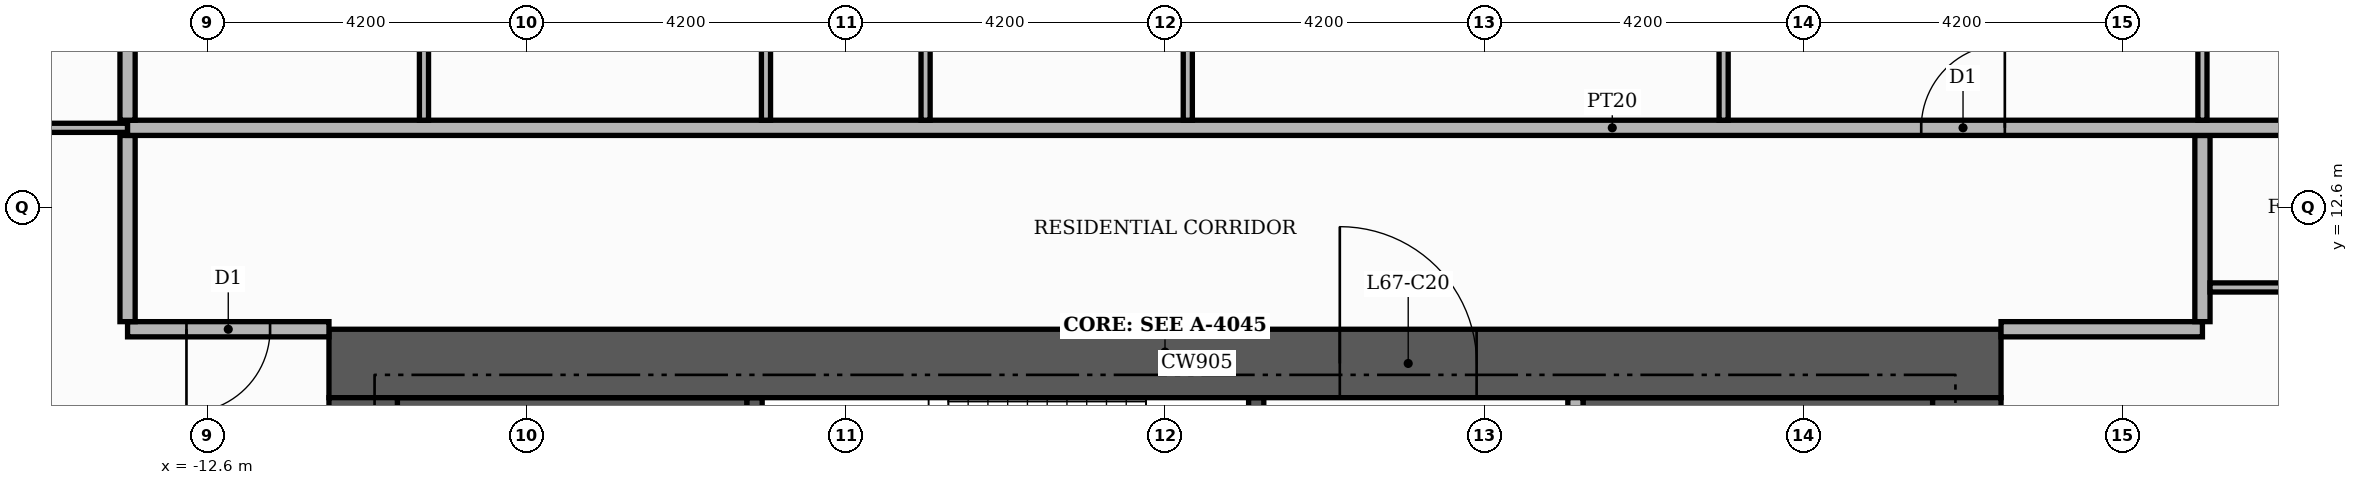
"""IFC4 building model, lengths in metres.
Left out: names, types, materials, properties, quantities, classifications, styles, units other than length and angle.
Written with IfcOpenShell. Run it as: python <this file> out.ifc"""

import sys

from ifc_helpers import new_model, si_unit, direction, frame, frame_2d, origin, place, context, subcontext, project, spatial, rectangle, extrude, element, fill, save


model = new_model("IFC4")
c1 = context("Model", 3, precision=1e-05, world=origin(), true_north=direction((0.0, 1.0)))
c2 = subcontext(c1, "Body", "Model", "MODEL_VIEW")
j1 = project(units=[si_unit("LENGTHUNIT", "METRE"), si_unit("PLANEANGLEUNIT", "RADIAN")], contexts=[c1])
p1 = place(None, origin())
s1 = spatial("IfcSite", under=j1, at=p1, CompositionType="ELEMENT")
p2 = place(p1, origin())
s2 = spatial("IfcBuilding", under=s1, at=p2, CompositionType="ELEMENT")
p3 = place(p2, frame((0.0, 0.0, 279.6)))
s3 = spatial("IfcBuildingStorey", under=s2, at=p3, CompositionType="ELEMENT", Elevation=279.6)
for number, where, z_axis, x_axis in (
    (1, (-10.1, 9.15, 0.0), (0.0, 0.0, 1.0), (1.0, 0.0, 0.0)),
    (2, (5.5, 9.15, 0.0), (0.0, 0.0, 1.0), (1.0, 0.0, 0.0)),
):
    element("IfcWall", number, at=place(p3, frame(where, z_axis=z_axis, x_axis=x_axis)), inside=s3, PredefinedType="SHEAR", context=c2, shape_type="SweptSolid", body=[
        extrude(rectangle(XDim=4.6, YDim=1.9, at=frame_2d((2.3, 0.0))), origin(), (0.0, 0.0, 1.0), 3.48),
    ])
p4 = place(p3, frame((-5.4, 7.25, 0.0), z_axis=(0.0, 0.0, 1.0), x_axis=(0.0, 1.0, 0.0)))
e3 = element("IfcWall", 3, at=p4, inside=s3, PredefinedType="SHEAR", context=c2, shape_type="SweptSolid", body=[
    extrude(rectangle(XDim=2.85, YDim=0.2, at=frame_2d((1.425, 0.0))), origin(), (0.0, 0.0, 1.0), 3.48),
])
p5 = place(p3, frame((1.2, 7.25, 0.0), z_axis=(0.0, 0.0, 1.0), x_axis=(0.0, 1.0, 0.0)))
e4 = element("IfcWall", 4, at=p5, inside=s3, PredefinedType="SHEAR", context=c2, shape_type="SweptSolid", body=[
    extrude(rectangle(XDim=2.85, YDim=0.2, at=frame_2d((1.425, 0.0))), origin(), (0.0, 0.0, 1.0), 3.48),
])
p6 = place(p5, frame((0.85, 0.0, 0.0)))
e5 = element("IfcOpeningElement", 5, at=p6, cuts=e4, PredefinedType="OPENING", context=c2, shape_type="SweptSolid", body=[
    extrude(rectangle(XDim=1.0, YDim=2.1, at=frame_2d((0.5, 1.05))), frame((0.0, 0.11, 0.0), z_axis=(0.0, -1.0, 0.0), x_axis=(1.0, 0.0, 0.0)), (0.0, 0.0, 1.0), 0.22),
])
p7 = place(p3, frame((-11.0, 10.55, 0.0), z_axis=(0.0, 0.0, 1.0), x_axis=(1.0, 0.0, 0.0)))
e6 = element("IfcWall", 6, at=p7, inside=s3, PredefinedType="SHEAR", context=c2, shape_type="SweptSolid", body=[
    extrude(rectangle(XDim=22.0, YDim=0.9, at=frame_2d((11.0, 0.0))), origin(), (0.0, 0.0, 1.0), 3.48),
])
p8 = place(p7, frame((13.3, 0.0, 0.0)))
e7 = element("IfcOpeningElement", 7, at=p8, cuts=e6, PredefinedType="OPENING", context=c2, shape_type="SweptSolid", body=[
    extrude(rectangle(XDim=1.8, YDim=2.2, at=frame_2d((0.9, 1.1))), frame((0.0, 0.46, 0.0), z_axis=(0.0, -1.0, 0.0), x_axis=(1.0, 0.0, 0.0)), (0.0, 0.0, 1.0), 0.92),
])
for number, where, z_axis, x_axis in (
    (8, (-10.55, -10.1, 0.0), (0.0, 0.0, 1.0), (0.0, 1.0, 0.0)),
    (9, (10.55, -10.1, 0.0), (0.0, 0.0, 1.0), (0.0, 1.0, 0.0)),
):
    element("IfcWall", number, at=place(p3, frame(where, z_axis=z_axis, x_axis=x_axis)), inside=s3, PredefinedType="SHEAR", context=c2, shape_type="SweptSolid", body=[
        extrude(rectangle(XDim=20.2, YDim=0.9, at=frame_2d((10.1, 0.0))), origin(), (0.0, 0.0, 1.0), 3.48),
    ])
p9 = place(p3, frame((5.4, 5.5, 0.0), z_axis=(0.0, 0.0, 1.0), x_axis=(0.0, 1.0, 0.0)))
e10 = element("IfcWall", 10, at=p9, inside=s3, PredefinedType="PARTITIONING", context=c2, shape_type="SweptSolid", body=[
    extrude(rectangle(XDim=4.6, YDim=0.2, at=frame_2d((2.3, 0.0))), origin(), (0.0, 0.0, 1.0), 3.48),
])
p10 = place(p9, frame((0.25, 0.0, 0.0)))
e11 = element("IfcOpeningElement", 11, at=p10, cuts=e10, PredefinedType="OPENING", context=c2, shape_type="SweptSolid", body=[
    extrude(rectangle(XDim=1.0, YDim=2.1, at=frame_2d((0.5, 1.05))), frame((0.0, 0.11, 0.0), z_axis=(0.0, -1.0, 0.0), x_axis=(1.0, 0.0, 0.0)), (0.0, 0.0, 1.0), 0.22),
])
p11 = place(p3, frame((-13.65, 11.0, 0.0), z_axis=(0.0, 0.0, 1.0), x_axis=(1.0, 0.0, 0.0)))
e12 = element("IfcWall", 12, at=p11, inside=s3, PredefinedType="PARTITIONING", context=c2, shape_type="SweptSolid", body=[
    extrude(rectangle(XDim=2.65, YDim=0.2, at=frame_2d((1.325, 0.0))), origin(), (0.0, 0.0, 1.0), 3.48),
])
p12 = place(p11, frame((0.775, 0.0, 0.0)))
e13 = element("IfcOpeningElement", 13, at=p12, cuts=e12, PredefinedType="OPENING", context=c2, shape_type="SweptSolid", body=[
    extrude(rectangle(XDim=1.1, YDim=2.4, at=frame_2d((0.55, 1.2))), frame((0.0, 0.11, 0.0), z_axis=(0.0, -1.0, 0.0), x_axis=(1.0, 0.0, 0.0)), (0.0, 0.0, 1.0), 0.22),
])
p13 = place(p3, frame((11.0, 11.0, 0.0), z_axis=(0.0, 0.0, 1.0), x_axis=(1.0, 0.0, 0.0)))
e14 = element("IfcWall", 14, at=p13, inside=s3, PredefinedType="PARTITIONING", context=c2, shape_type="SweptSolid", body=[
    extrude(rectangle(XDim=2.65, YDim=0.2, at=frame_2d((1.325, 0.0))), origin(), (0.0, 0.0, 1.0), 3.48),
])
for number, where, z_axis, x_axis in (
    (15, (-13.65, 11.1, 0.0), (0.0, 0.0, 1.0), (0.0, 1.0, 0.0)),
    (16, (13.65, 11.1, 0.0), (0.0, 0.0, 1.0), (0.0, 1.0, 0.0)),
):
    element("IfcWall", number, at=place(p3, frame(where, z_axis=z_axis, x_axis=x_axis)), inside=s3, PredefinedType="PARTITIONING", context=c2, shape_type="SweptSolid", body=[
        extrude(rectangle(XDim=2.45, YDim=0.2, at=frame_2d((1.225, 0.0))), origin(), (0.0, 0.0, 1.0), 3.48),
    ])
p14 = place(p3, frame((13.75, 11.55, 0.0), z_axis=(0.0, 0.0, 1.0), x_axis=(1.0, 0.0, 0.0)))
e17 = element("IfcWall", 17, at=p14, inside=s3, PredefinedType="PARTITIONING", context=c2, shape_type="SweptSolid", body=[
    extrude(rectangle(XDim=5.17, YDim=0.12, at=frame_2d((2.585, 0.0))), origin(), (0.0, 0.0, 1.0), 3.48),
])
p15 = place(p3, frame((-19.82, 13.65, 0.0), z_axis=(0.0, 0.0, 1.0), x_axis=(1.0, 0.0, 0.0)))
e18 = element("IfcWall", 18, at=p15, inside=s3, PredefinedType="PARTITIONING", context=c2, shape_type="SweptSolid", body=[
    extrude(rectangle(XDim=6.17, YDim=0.12, at=frame_2d((3.085, 0.0))), origin(), (0.0, 0.0, 1.0), 3.48),
])
p16 = place(p15, frame((2.635, 0.0, 0.0)))
e19 = element("IfcOpeningElement", 19, at=p16, cuts=e18, PredefinedType="OPENING", context=c2, shape_type="SweptSolid", body=[
    extrude(rectangle(XDim=0.9, YDim=2.1, at=frame_2d((0.45, 1.05))), frame((0.0, 0.07, 0.0), z_axis=(0.0, -1.0, 0.0), x_axis=(1.0, 0.0, 0.0)), (0.0, 0.0, 1.0), 0.14),
])
p17 = place(p3, frame((-13.65, 13.65, 0.0), z_axis=(0.0, 0.0, 1.0), x_axis=(1.0, 0.0, 0.0)))
e20 = element("IfcWall", 20, at=p17, inside=s3, PredefinedType="PARTITIONING", context=c2, shape_type="SweptSolid", body=[
    extrude(rectangle(XDim=39.07, YDim=0.2, at=frame_2d((19.535, 0.0))), origin(), (0.0, 0.0, 1.0), 3.48),
])
p18 = place(p17, frame((23.6, 0.0, 0.0)))
e21 = element("IfcOpeningElement", 21, at=p18, cuts=e20, PredefinedType="OPENING", context=c2, shape_type="SweptSolid", body=[
    extrude(rectangle(XDim=1.1, YDim=2.4, at=frame_2d((0.55, 1.2))), frame((0.0, 0.11, 0.0), z_axis=(0.0, -1.0, 0.0), x_axis=(1.0, 0.0, 0.0)), (0.0, 0.0, 1.0), 0.22),
])
p19 = place(p3, frame((-13.65, 13.75, 0.0), z_axis=(0.0, 0.0, 1.0), x_axis=(0.0, 1.0, 0.0)))
e22 = element("IfcWall", 22, at=p19, inside=s3, PredefinedType="PARTITIONING", context=c2, shape_type="SweptSolid", body=[
    extrude(rectangle(XDim=11.67, YDim=0.2, at=frame_2d((5.835, 0.0))), origin(), (0.0, 0.0, 1.0), 3.48),
])
for number, where, z_axis, x_axis in (
    (23, (-9.75, 13.75, 0.0), (0.0, 0.0, 1.0), (0.0, 1.0, 0.0)),
    (24, (-5.25, 13.75, 0.0), (0.0, 0.0, 1.0), (0.0, 1.0, 0.0)),
    (25, (-3.15, 13.75, 0.0), (0.0, 0.0, 1.0), (0.0, 1.0, 0.0)),
    (26, (0.3, 13.75, 0.0), (0.0, 0.0, 1.0), (0.0, 1.0, 0.0)),
    (27, (7.35, 13.75, 0.0), (0.0, 0.0, 1.0), (0.0, 1.0, 0.0)),
):
    element("IfcWall", number, at=place(p3, frame(where, z_axis=z_axis, x_axis=x_axis)), inside=s3, PredefinedType="PARTITIONING", context=c2, shape_type="SweptSolid", body=[
        extrude(rectangle(XDim=4.81, YDim=0.12, at=frame_2d((2.405, 0.0))), origin(), (0.0, 0.0, 1.0), 3.48),
    ])
p20 = place(p3, frame((13.65, 13.75, 0.0), z_axis=(0.0, 0.0, 1.0), x_axis=(0.0, 1.0, 0.0)))
e28 = element("IfcWall", 28, at=p20, inside=s3, PredefinedType="PARTITIONING", context=c2, shape_type="SweptSolid", body=[
    extrude(rectangle(XDim=6.31, YDim=0.12, at=frame_2d((3.155, 0.0))), origin(), (0.0, 0.0, 1.0), 3.48),
])
p21 = place(p20, frame((2.685, 0.0, 0.0)))
e29 = element("IfcOpeningElement", 29, at=p21, cuts=e28, PredefinedType="OPENING", context=c2, shape_type="SweptSolid", body=[
    extrude(rectangle(XDim=0.9, YDim=2.1, at=frame_2d((0.45, 1.05))), frame((0.0, 0.07, 0.0), z_axis=(0.0, -1.0, 0.0), x_axis=(1.0, 0.0, 0.0)), (0.0, 0.0, 1.0), 0.14),
])
p22 = place(p8, origin())
e30 = element("IfcDoor", 30, at=p22, inside=s3, OperationType="DOUBLE_DOOR_SINGLE_SWING", PredefinedType="DOOR", context=c2, shape_type="SweptSolid", body=[
    extrude(rectangle(XDim=1.8, YDim=2.2, at=frame_2d((0.9, 1.1))), frame((0.0, 0.025, 0.0), z_axis=(0.0, -1.0, 0.0), x_axis=(1.0, 0.0, 0.0)), (0.0, 0.0, 1.0), 0.05),
])
fill(e7, e30)
p23 = place(p18, origin())
e31 = element("IfcDoor", 31, at=p23, inside=s3, OperationType="SINGLE_SWING_RIGHT", PredefinedType="DOOR", context=c2, shape_type="SweptSolid", body=[
    extrude(rectangle(XDim=1.1, YDim=2.4, at=frame_2d((0.55, 1.2))), frame((0.0, 0.025, 0.0), z_axis=(0.0, -1.0, 0.0), x_axis=(1.0, 0.0, 0.0)), (0.0, 0.0, 1.0), 0.05),
])
fill(e21, e31)
p24 = place(p12, frame((1.1, 0.0, 0.0), z_axis=(0.0, 0.0, 1.0), x_axis=(-1.0, 0.0, 0.0)))
e32 = element("IfcDoor", 32, at=p24, inside=s3, OperationType="SINGLE_SWING_LEFT", PredefinedType="DOOR", context=c2, shape_type="SweptSolid", body=[
    extrude(rectangle(XDim=1.1, YDim=2.4, at=frame_2d((0.55, 1.2))), frame((0.0, 0.025, 0.0), z_axis=(0.0, -1.0, 0.0), x_axis=(1.0, 0.0, 0.0)), (0.0, 0.0, 1.0), 0.05),
])
fill(e13, e32)
save(model, sys.argv[1])
